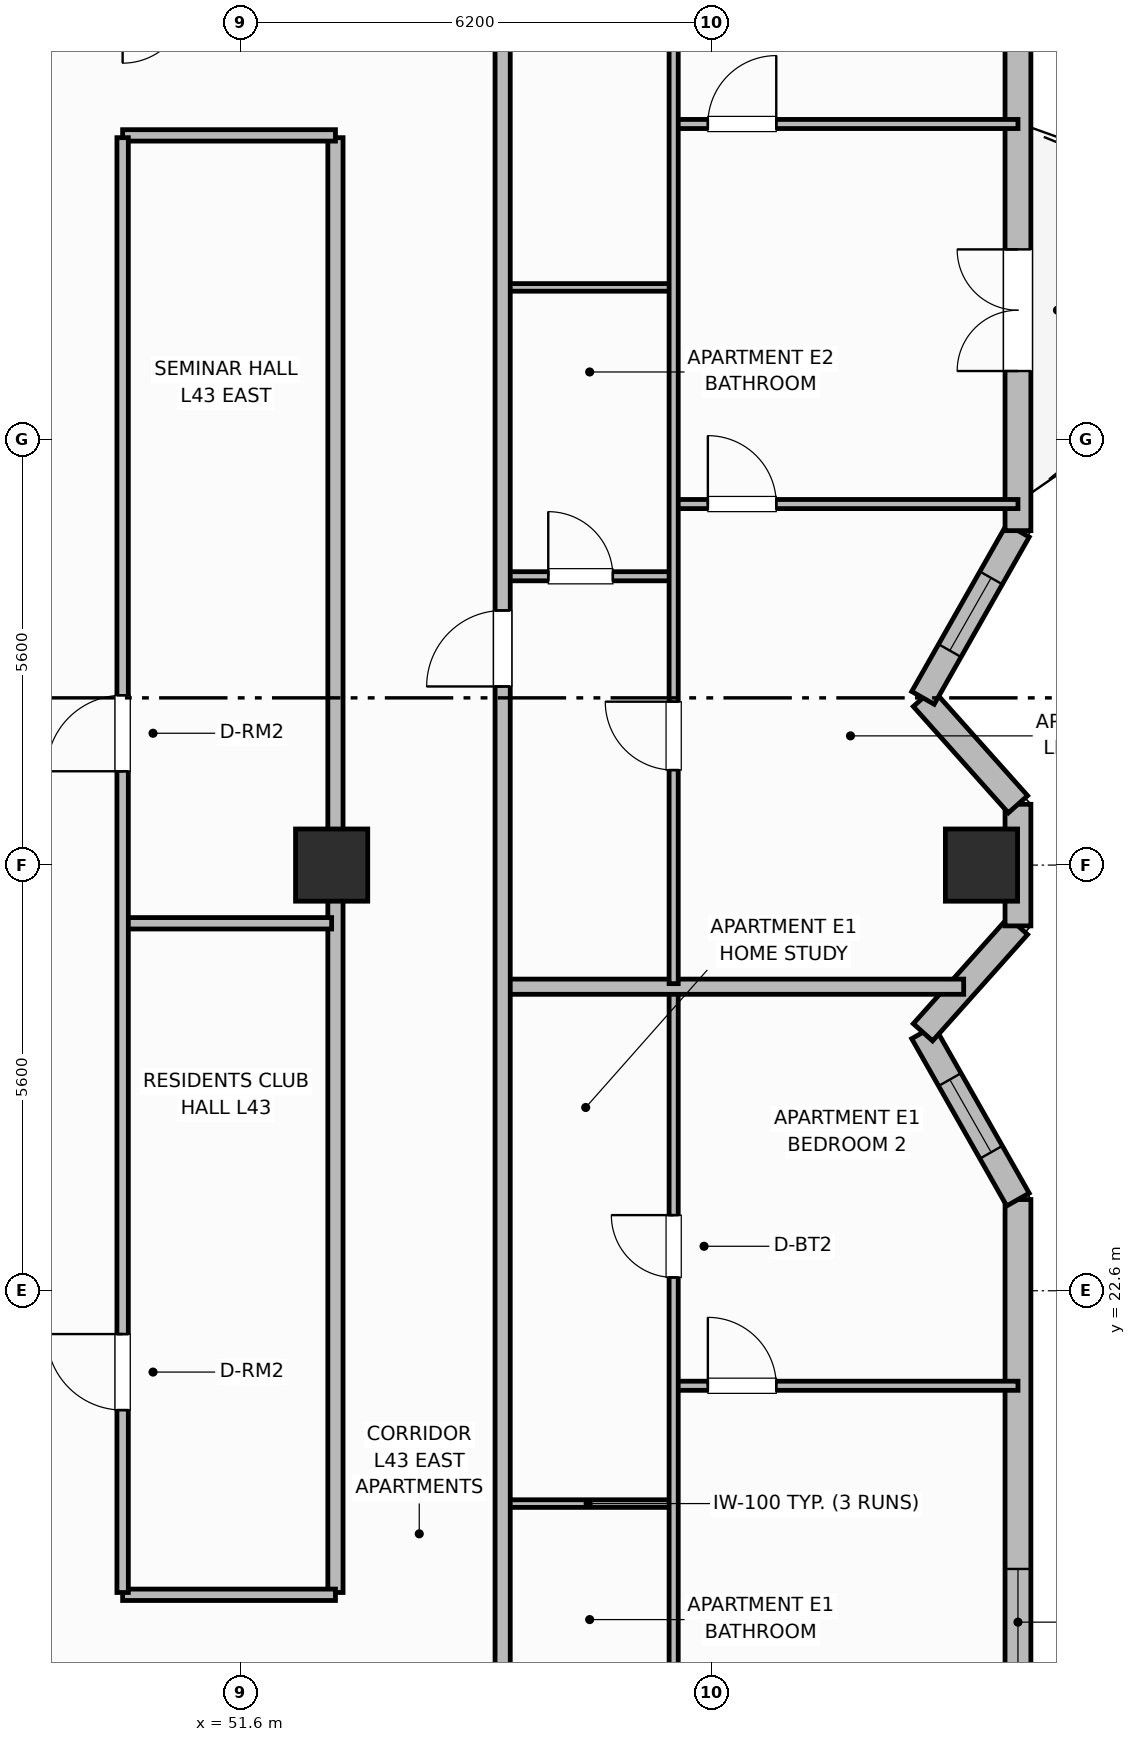
"""IFC4 building model, lengths in metres.
Left out: names, types, materials, properties, quantities, classifications, styles, units other than length and angle.
Written with IfcOpenShell. Run it as: python <this file> out.ifc"""

import sys

from ifc_helpers import new_model, si_unit, direction, frame, frame_2d, origin, origin_2d, place, context, subcontext, project, spatial, rectangle, extrude, element, fill, save


model = new_model("IFC4")
c1 = context("Model", 3, precision=1e-05, world=origin(), true_north=direction((0.0, 1.0)))
c2 = subcontext(c1, "Body", "Model", "MODEL_VIEW")
j1 = project(units=[si_unit("LENGTHUNIT", "METRE"), si_unit("PLANEANGLEUNIT", "RADIAN")], contexts=[c1])
p1 = place(None, origin())
s1 = spatial("IfcSite", under=j1, at=p1, CompositionType="ELEMENT")
p2 = place(p1, origin())
s2 = spatial("IfcBuilding", under=s1, at=p2, CompositionType="ELEMENT")
p3 = place(p2, frame((0.0, 0.0, 173.7)))
s3 = spatial("IfcBuildingStorey", under=s2, at=p3, CompositionType="ELEMENT", Elevation=173.7)
for number, where, z_axis, x_axis in (
    (1, (52.8, 28.2, 0.0), (0.0, 0.0, 1.0), (1.0, 0.0, 0.0)),
    (2, (61.35, 28.2, 0.0), (0.0, 0.0, 1.0), (1.0, 0.0, 0.0)),
):
    element("IfcColumn", number, at=place(p3, frame(where, z_axis=z_axis, x_axis=x_axis)), inside=s3, PredefinedType="COLUMN", context=c2, shape_type="SweptSolid", body=[
        extrude(rectangle(XDim=0.95, YDim=0.95, at=origin_2d()), origin(), (0.0, 0.0, 1.0), 3.7),
    ])
p4 = place(p3, frame((61.83, 10.5, 0.0), z_axis=(0.0, 0.0, 1.0), x_axis=(0.0, 1.0, 0.0)))
e3 = element("IfcWall", 3, at=p4, inside=s3, PredefinedType="SOLIDWALL", context=c2, shape_type="SweptSolid", body=[
    extrude(rectangle(XDim=13.3, YDim=0.34, at=frame_2d((6.65, 0.0))), origin(), (0.0, 0.0, 1.0), 2.72),
])
p5 = place(p4, frame((1.6, 0.0, 0.7)))
e4 = element("IfcOpeningElement", 4, at=p5, cuts=e3, PredefinedType="OPENING", context=c2, shape_type="SweptSolid", body=[
    extrude(rectangle(XDim=2.1, YDim=1.9, at=frame_2d((1.05, 0.95))), frame((0.0, 0.18, 0.0), z_axis=(0.0, -1.0, 0.0), x_axis=(1.0, 0.0, 0.0)), (0.0, 0.0, 1.0), 0.36),
])
p6 = place(p4, frame((7.04, 0.0, 0.71)))
e5 = element("IfcOpeningElement", 5, at=p6, cuts=e3, PredefinedType="OPENING", context=c2, shape_type="SweptSolid", body=[
    extrude(rectangle(XDim=1.4, YDim=1.85, at=frame_2d((0.7, 0.925))), frame((0.0, 0.18, 0.0), z_axis=(0.0, -1.0, 0.0), x_axis=(1.0, 0.0, 0.0)), (0.0, 0.0, 1.0), 0.36),
])
p7 = place(p3, frame((61.83, 23.8, 0.0), z_axis=(0.0, 0.0, 1.0), x_axis=(-0.494017696272, 0.869451847873, 0.0)))
e6 = element("IfcWall", 6, at=p7, inside=s3, PredefinedType="SOLIDWALL", context=c2, shape_type="SweptSolid", body=[
    extrude(rectangle(XDim=2.53, YDim=0.34, at=frame_2d((1.265, 0.0))), origin(), (0.0, 0.0, 1.0), 2.72),
])
p8 = place(p7, frame((0.715, 0.0, 0.91)))
e7 = element("IfcOpeningElement", 7, at=p8, cuts=e6, PredefinedType="OPENING", context=c2, shape_type="SweptSolid", body=[
    extrude(rectangle(XDim=1.1, YDim=1.65, at=frame_2d((0.55, 0.825))), frame((0.0, 0.18, 0.0), z_axis=(0.0, -1.0, 0.0), x_axis=(1.0, 0.0, 0.0)), (0.0, 0.0, 1.0), 0.36),
])
p9 = place(p3, frame((60.58, 26.0, 0.0), z_axis=(0.0, 0.0, 1.0), x_axis=(0.666041619974, 0.74591457987, 0.0)))
e8 = element("IfcWall", 8, at=p9, inside=s3, PredefinedType="SOLIDWALL", context=c2, shape_type="SweptSolid", body=[
    extrude(rectangle(XDim=1.877, YDim=0.34, at=frame_2d((0.938, 0.0))), origin(), (0.0, 0.0, 1.0), 2.72),
])
p10 = place(p3, frame((61.83, 27.4, 0.0), z_axis=(0.0, 0.0, 1.0), x_axis=(0.0, 1.0, 0.0)))
e9 = element("IfcWall", 9, at=p10, inside=s3, PredefinedType="SOLIDWALL", context=c2, shape_type="SweptSolid", body=[
    extrude(rectangle(XDim=1.6, YDim=0.34, at=frame_2d((0.8, 0.0))), origin(), (0.0, 0.0, 1.0), 2.72),
])
p11 = place(p3, frame((61.83, 29.0, 0.0), z_axis=(0.0, 0.0, 1.0), x_axis=(-0.666041619974, 0.74591457987, 0.0)))
e10 = element("IfcWall", 10, at=p11, inside=s3, PredefinedType="SOLIDWALL", context=c2, shape_type="SweptSolid", body=[
    extrude(rectangle(XDim=1.877, YDim=0.34, at=frame_2d((0.938, 0.0))), origin(), (0.0, 0.0, 1.0), 2.72),
])
p12 = place(p3, frame((60.58, 30.4, 0.0), z_axis=(0.0, 0.0, 1.0), x_axis=(0.493976255291, 0.869475393101, 0.0)))
e11 = element("IfcWall", 11, at=p12, inside=s3, PredefinedType="SOLIDWALL", context=c2, shape_type="SweptSolid", body=[
    extrude(rectangle(XDim=2.531, YDim=0.34, at=frame_2d((1.265, 0.0))), origin(), (0.0, 0.0, 1.0), 2.72),
])
p13 = place(p12, frame((0.715, 0.0, 0.91)))
e12 = element("IfcOpeningElement", 12, at=p13, cuts=e11, PredefinedType="OPENING", context=c2, shape_type="SweptSolid", body=[
    extrude(rectangle(XDim=1.1, YDim=1.65, at=frame_2d((0.55, 0.825))), frame((0.0, 0.18, 0.0), z_axis=(0.0, -1.0, 0.0), x_axis=(1.0, 0.0, 0.0)), (0.0, 0.0, 1.0), 0.36),
])
p14 = place(p3, frame((61.83, 32.6, 0.0), z_axis=(0.0, 0.0, 1.0), x_axis=(0.0, 1.0, 0.0)))
e13 = element("IfcWall", 13, at=p14, inside=s3, PredefinedType="SOLIDWALL", context=c2, shape_type="SweptSolid", body=[
    extrude(rectangle(XDim=13.3, YDim=0.34, at=frame_2d((6.65, 0.0))), origin(), (0.0, 0.0, 1.0), 2.72),
])
p15 = place(p14, frame((2.1, 0.0, 0.0)))
e14 = element("IfcOpeningElement", 14, at=p15, cuts=e13, PredefinedType="OPENING", context=c2, shape_type="SweptSolid", body=[
    extrude(rectangle(XDim=1.6, YDim=2.1, at=frame_2d((0.8, 1.05))), frame((0.0, 0.18, 0.0), z_axis=(0.0, -1.0, 0.0), x_axis=(1.0, 0.0, 0.0)), (0.0, 0.0, 1.0), 0.36),
])
p16 = place(p14, frame((9.75, 0.0, 0.75)))
e15 = element("IfcOpeningElement", 15, at=p16, cuts=e13, PredefinedType="OPENING", context=c2, shape_type="SweptSolid", body=[
    extrude(rectangle(XDim=1.8, YDim=1.85, at=frame_2d((0.9, 0.925))), frame((0.0, 0.18, 0.0), z_axis=(0.0, -1.0, 0.0), x_axis=(1.0, 0.0, 0.0)), (0.0, 0.0, 1.0), 0.36),
])
p17 = place(p3, frame((52.85, 18.63, 0.0), z_axis=(0.0, 0.0, 1.0), x_axis=(0.0, 1.0, 0.0)))
e16 = element("IfcWall", 16, at=p17, inside=s3, PredefinedType="PARTITIONING", context=c2, shape_type="SweptSolid", body=[
    extrude(rectangle(XDim=19.14, YDim=0.2, at=frame_2d((9.57, 0.0))), origin(), (0.0, 0.0, 1.0), 2.55),
])
for number, where, z_axis, x_axis in (
    (17, (50.05, 18.6, 0.0), (0.0, 0.0, 1.0), (1.0, 0.0, 0.0)),
    (18, (50.05, 37.8, 0.0), (0.0, 0.0, 1.0), (1.0, 0.0, 0.0)),
):
    element("IfcWall", number, at=place(p3, frame(where, z_axis=z_axis, x_axis=x_axis)), inside=s3, PredefinedType="PARTITIONING", context=c2, shape_type="SweptSolid", body=[
        extrude(rectangle(XDim=2.8, YDim=0.15, at=frame_2d((1.4, 0.0))), origin(), (0.0, 0.0, 1.0), 2.55),
    ])
p18 = place(p3, frame((50.08, 27.434, 0.0), z_axis=(0.0, 0.0, 1.0), x_axis=(1.0, 0.0, 0.0)))
e19 = element("IfcWall", 19, at=p18, inside=s3, PredefinedType="PARTITIONING", context=c2, shape_type="SweptSolid", body=[
    extrude(rectangle(XDim=2.72, YDim=0.15, at=frame_2d((1.36, 0.0))), origin(), (0.0, 0.0, 1.0), 2.55),
])
p19 = place(p3, frame((50.05, 18.63, 0.0), z_axis=(0.0, 0.0, 1.0), x_axis=(0.0, 1.0, 0.0)))
e20 = element("IfcWall", 20, at=p19, inside=s3, PredefinedType="PARTITIONING", context=c2, shape_type="SweptSolid", body=[
    extrude(rectangle(XDim=19.14, YDim=0.15, at=frame_2d((9.57, 0.0))), origin(), (0.0, 0.0, 1.0), 2.55),
])
p20 = place(p19, frame((2.4, 0.0, 0.0)))
e21 = element("IfcOpeningElement", 21, at=p20, cuts=e20, PredefinedType="OPENING", context=c2, shape_type="SweptSolid", body=[
    extrude(rectangle(XDim=1.0, YDim=2.15, at=frame_2d((0.5, 1.075))), frame((0.0, 0.085, 0.0), z_axis=(0.0, -1.0, 0.0), x_axis=(1.0, 0.0, 0.0)), (0.0, 0.0, 1.0), 0.17),
])
p21 = place(p19, frame((10.804, 0.0, 0.0)))
e22 = element("IfcOpeningElement", 22, at=p21, cuts=e20, PredefinedType="OPENING", context=c2, shape_type="SweptSolid", body=[
    extrude(rectangle(XDim=1.0, YDim=2.15, at=frame_2d((0.5, 1.075))), frame((0.0, 0.085, 0.0), z_axis=(0.0, -1.0, 0.0), x_axis=(1.0, 0.0, 0.0)), (0.0, 0.0, 1.0), 0.17),
])
p22 = place(p3, frame((55.05, 19.8, 0.0), z_axis=(0.0, 0.0, 1.0), x_axis=(1.0, 0.0, 0.0)))
e23 = element("IfcWall", 23, at=p22, inside=s3, PredefinedType="PARTITIONING", context=c2, shape_type="SweptSolid", body=[
    extrude(rectangle(XDim=2.25, YDim=0.1, at=frame_2d((1.125, 0.0))), origin(), (0.0, 0.0, 1.0), 2.55),
])
p23 = place(p3, frame((57.3, 21.35, 0.0), z_axis=(0.0, 0.0, 1.0), x_axis=(1.0, 0.0, 0.0)))
e24 = element("IfcWall", 24, at=p23, inside=s3, PredefinedType="PARTITIONING", context=c2, shape_type="SweptSolid", body=[
    extrude(rectangle(XDim=4.53, YDim=0.12, at=frame_2d((2.265, 0.0))), origin(), (0.0, 0.0, 1.0), 2.55),
])
p24 = place(p23, frame((0.45, 0.0, 0.0)))
e25 = element("IfcOpeningElement", 25, at=p24, cuts=e24, PredefinedType="OPENING", context=c2, shape_type="SweptSolid", body=[
    extrude(rectangle(XDim=0.9, YDim=2.1, at=frame_2d((0.45, 1.05))), frame((0.0, 0.07, 0.0), z_axis=(0.0, -1.0, 0.0), x_axis=(1.0, 0.0, 0.0)), (0.0, 0.0, 1.0), 0.14),
])
p25 = place(p3, frame((57.3, 10.64, 0.0), z_axis=(0.0, 0.0, 1.0), x_axis=(0.0, 1.0, 0.0)))
e26 = element("IfcWall", 26, at=p25, inside=s3, PredefinedType="PARTITIONING", context=c2, shape_type="SweptSolid", body=[
    extrude(rectangle(XDim=15.92, YDim=0.12, at=frame_2d((7.96, 0.0))), origin(), (0.0, 0.0, 1.0), 2.55),
])
p26 = place(p25, frame((0.41, 0.0, 0.0)))
e27 = element("IfcOpeningElement", 27, at=p26, cuts=e26, PredefinedType="OPENING", context=c2, shape_type="SweptSolid", body=[
    extrude(rectangle(XDim=0.9, YDim=2.1, at=frame_2d((0.45, 1.05))), frame((0.0, 0.07, 0.0), z_axis=(0.0, -1.0, 0.0), x_axis=(1.0, 0.0, 0.0)), (0.0, 0.0, 1.0), 0.14),
])
p27 = place(p25, frame((12.135, 0.0, 0.0)))
e28 = element("IfcOpeningElement", 28, at=p27, cuts=e26, PredefinedType="OPENING", context=c2, shape_type="SweptSolid", body=[
    extrude(rectangle(XDim=0.82, YDim=2.08, at=frame_2d((0.41, 1.04))), frame((0.0, 0.07, 0.0), z_axis=(0.0, -1.0, 0.0), x_axis=(1.0, 0.0, 0.0)), (0.0, 0.0, 1.0), 0.14),
])
p28 = place(p3, frame((55.05, 26.6, 0.0), z_axis=(0.0, 0.0, 1.0), x_axis=(1.0, 0.0, 0.0)))
e29 = element("IfcWall", 29, at=p28, inside=s3, PredefinedType="PARTITIONING", context=c2, shape_type="SweptSolid", body=[
    extrude(rectangle(XDim=6.066, YDim=0.2, at=frame_2d((3.033, 0.0))), origin(), (0.0, 0.0, 1.0), 2.55),
])
p29 = place(p3, frame((55.05, 32.0, 0.0), z_axis=(0.0, 0.0, 1.0), x_axis=(1.0, 0.0, 0.0)))
e30 = element("IfcWall", 30, at=p29, inside=s3, PredefinedType="PARTITIONING", context=c2, shape_type="SweptSolid", body=[
    extrude(rectangle(XDim=2.25, YDim=0.12, at=frame_2d((1.125, 0.0))), origin(), (0.0, 0.0, 1.0), 2.55),
])
p30 = place(p29, frame((0.6, 0.0, 0.0)))
e31 = element("IfcOpeningElement", 31, at=p30, cuts=e30, PredefinedType="OPENING", context=c2, shape_type="SweptSolid", body=[
    extrude(rectangle(XDim=0.85, YDim=2.1, at=frame_2d((0.425, 1.05))), frame((0.0, 0.07, 0.0), z_axis=(0.0, -1.0, 0.0), x_axis=(1.0, 0.0, 0.0)), (0.0, 0.0, 1.0), 0.14),
])
p31 = place(p3, frame((55.05, 35.8, 0.0), z_axis=(0.0, 0.0, 1.0), x_axis=(1.0, 0.0, 0.0)))
e32 = element("IfcWall", 32, at=p31, inside=s3, PredefinedType="PARTITIONING", context=c2, shape_type="SweptSolid", body=[
    extrude(rectangle(XDim=2.25, YDim=0.1, at=frame_2d((1.125, 0.0))), origin(), (0.0, 0.0, 1.0), 2.55),
])
p32 = place(p3, frame((57.3, 32.95, 0.0), z_axis=(0.0, 0.0, 1.0), x_axis=(1.0, 0.0, 0.0)))
e33 = element("IfcWall", 33, at=p32, inside=s3, PredefinedType="PARTITIONING", context=c2, shape_type="SweptSolid", body=[
    extrude(rectangle(XDim=4.53, YDim=0.12, at=frame_2d((2.265, 0.0))), origin(), (0.0, 0.0, 1.0), 2.55),
])
p33 = place(p32, frame((0.45, 0.0, 0.0)))
e34 = element("IfcOpeningElement", 34, at=p33, cuts=e33, PredefinedType="OPENING", context=c2, shape_type="SweptSolid", body=[
    extrude(rectangle(XDim=0.9, YDim=2.1, at=frame_2d((0.45, 1.05))), frame((0.0, 0.07, 0.0), z_axis=(0.0, -1.0, 0.0), x_axis=(1.0, 0.0, 0.0)), (0.0, 0.0, 1.0), 0.14),
])
p34 = place(p3, frame((57.3, 37.95, 0.0), z_axis=(0.0, 0.0, 1.0), x_axis=(1.0, 0.0, 0.0)))
e35 = element("IfcWall", 35, at=p34, inside=s3, PredefinedType="PARTITIONING", context=c2, shape_type="SweptSolid", body=[
    extrude(rectangle(XDim=4.53, YDim=0.12, at=frame_2d((2.265, 0.0))), origin(), (0.0, 0.0, 1.0), 2.55),
])
p35 = place(p34, frame((0.45, 0.0, 0.0)))
e36 = element("IfcOpeningElement", 36, at=p35, cuts=e35, PredefinedType="OPENING", context=c2, shape_type="SweptSolid", body=[
    extrude(rectangle(XDim=0.9, YDim=2.1, at=frame_2d((0.45, 1.05))), frame((0.0, 0.07, 0.0), z_axis=(0.0, -1.0, 0.0), x_axis=(1.0, 0.0, 0.0)), (0.0, 0.0, 1.0), 0.14),
])
p36 = place(p3, frame((57.3, 26.64, 0.0), z_axis=(0.0, 0.0, 1.0), x_axis=(0.0, 1.0, 0.0)))
e37 = element("IfcWall", 37, at=p36, inside=s3, PredefinedType="PARTITIONING", context=c2, shape_type="SweptSolid", body=[
    extrude(rectangle(XDim=19.12, YDim=0.12, at=frame_2d((9.56, 0.0))), origin(), (0.0, 0.0, 1.0), 2.55),
])
p37 = place(p36, frame((2.81, 0.0, 0.0)))
e38 = element("IfcOpeningElement", 38, at=p37, cuts=e37, PredefinedType="OPENING", context=c2, shape_type="SweptSolid", body=[
    extrude(rectangle(XDim=0.9, YDim=2.1, at=frame_2d((0.45, 1.05))), frame((0.0, 0.07, 0.0), z_axis=(0.0, -1.0, 0.0), x_axis=(1.0, 0.0, 0.0)), (0.0, 0.0, 1.0), 0.14),
])
p38 = place(p36, frame((15.365, 0.0, 0.0)))
e39 = element("IfcOpeningElement", 39, at=p38, cuts=e37, PredefinedType="OPENING", context=c2, shape_type="SweptSolid", body=[
    extrude(rectangle(XDim=0.82, YDim=2.08, at=frame_2d((0.41, 1.04))), frame((0.0, 0.07, 0.0), z_axis=(0.0, -1.0, 0.0), x_axis=(1.0, 0.0, 0.0)), (0.0, 0.0, 1.0), 0.14),
])
p39 = place(p3, frame((55.05, 10.6, 0.0), z_axis=(0.0, 0.0, 1.0), x_axis=(0.0, 1.0, 0.0)))
e40 = element("IfcWall", 40, at=p39, inside=s3, PredefinedType="PARTITIONING", context=c2, shape_type="SweptSolid", body=[
    extrude(rectangle(XDim=35.2, YDim=0.2, at=frame_2d((17.6, 0.0))), origin(), (0.0, 0.0, 1.0), 2.55),
])
p40 = place(p39, frame((2.65, 0.0, 0.0)))
e41 = element("IfcOpeningElement", 41, at=p40, cuts=e40, PredefinedType="OPENING", context=c2, shape_type="SweptSolid", body=[
    extrude(rectangle(XDim=1.0, YDim=2.15, at=frame_2d((0.5, 1.075))), frame((0.0, 0.11, 0.0), z_axis=(0.0, -1.0, 0.0), x_axis=(1.0, 0.0, 0.0)), (0.0, 0.0, 1.0), 0.22),
])
p41 = place(p39, frame((19.95, 0.0, 0.0)))
e42 = element("IfcOpeningElement", 42, at=p41, cuts=e40, PredefinedType="OPENING", context=c2, shape_type="SweptSolid", body=[
    extrude(rectangle(XDim=1.0, YDim=2.15, at=frame_2d((0.5, 1.075))), frame((0.0, 0.11, 0.0), z_axis=(0.0, -1.0, 0.0), x_axis=(1.0, 0.0, 0.0)), (0.0, 0.0, 1.0), 0.22),
])
p42 = place(p6, origin())
e43 = element("IfcWindow", 43, at=p42, inside=s3, PartitioningType="SINGLE_PANEL", PredefinedType="WINDOW", context=c2, shape_type="SweptSolid", body=[
    extrude(rectangle(XDim=1.4, YDim=1.85, at=frame_2d((0.7, 0.925))), frame((0.0, 0.03, 0.0), z_axis=(0.0, -1.0, 0.0), x_axis=(1.0, 0.0, 0.0)), (0.0, 0.0, 1.0), 0.06),
])
fill(e5, e43)
p43 = place(p8, origin())
e44 = element("IfcWindow", 44, at=p43, inside=s3, PartitioningType="SINGLE_PANEL", PredefinedType="WINDOW", context=c2, shape_type="SweptSolid", body=[
    extrude(rectangle(XDim=1.1, YDim=1.65, at=frame_2d((0.55, 0.825))), frame((0.0, 0.03, 0.0), z_axis=(0.0, -1.0, 0.0), x_axis=(1.0, 0.0, 0.0)), (0.0, 0.0, 1.0), 0.06),
])
fill(e7, e44)
p44 = place(p13, origin())
e45 = element("IfcWindow", 45, at=p44, inside=s3, PartitioningType="SINGLE_PANEL", PredefinedType="WINDOW", context=c2, shape_type="SweptSolid", body=[
    extrude(rectangle(XDim=1.1, YDim=1.65, at=frame_2d((0.55, 0.825))), frame((0.0, 0.03, 0.0), z_axis=(0.0, -1.0, 0.0), x_axis=(1.0, 0.0, 0.0)), (0.0, 0.0, 1.0), 0.06),
])
fill(e12, e45)
p45 = place(p15, origin())
e46 = element("IfcDoor", 46, at=p45, inside=s3, OperationType="DOUBLE_DOOR_SINGLE_SWING", PredefinedType="DOOR", context=c2, shape_type="SweptSolid", body=[
    extrude(rectangle(XDim=1.6, YDim=2.1, at=frame_2d((0.8, 1.05))), frame((0.0, 0.025, 0.0), z_axis=(0.0, -1.0, 0.0), x_axis=(1.0, 0.0, 0.0)), (0.0, 0.0, 1.0), 0.05),
])
fill(e14, e46)
p46 = place(p20, origin())
e47 = element("IfcDoor", 47, at=p46, inside=s3, OperationType="SINGLE_SWING_RIGHT", PredefinedType="DOOR", context=c2, shape_type="SweptSolid", body=[
    extrude(rectangle(XDim=1.0, YDim=2.15, at=frame_2d((0.5, 1.075))), frame((0.0, 0.025, 0.0), z_axis=(0.0, -1.0, 0.0), x_axis=(1.0, 0.0, 0.0)), (0.0, 0.0, 1.0), 0.05),
])
fill(e21, e47)
p47 = place(p21, origin())
e48 = element("IfcDoor", 48, at=p47, inside=s3, OperationType="SINGLE_SWING_LEFT", PredefinedType="DOOR", context=c2, shape_type="SweptSolid", body=[
    extrude(rectangle(XDim=1.0, YDim=2.15, at=frame_2d((0.5, 1.075))), frame((0.0, 0.025, 0.0), z_axis=(0.0, -1.0, 0.0), x_axis=(1.0, 0.0, 0.0)), (0.0, 0.0, 1.0), 0.05),
])
fill(e22, e48)
p48 = place(p24, origin())
e49 = element("IfcDoor", 49, at=p48, inside=s3, OperationType="SINGLE_SWING_LEFT", PredefinedType="DOOR", context=c2, shape_type="SweptSolid", body=[
    extrude(rectangle(XDim=0.9, YDim=2.1, at=frame_2d((0.45, 1.05))), frame((0.0, 0.025, 0.0), z_axis=(0.0, -1.0, 0.0), x_axis=(1.0, 0.0, 0.0)), (0.0, 0.0, 1.0), 0.05),
])
fill(e25, e49)
p49 = place(p27, origin())
e50 = element("IfcDoor", 50, at=p49, inside=s3, OperationType="SINGLE_SWING_RIGHT", PredefinedType="DOOR", context=c2, shape_type="SweptSolid", body=[
    extrude(rectangle(XDim=0.82, YDim=2.08, at=frame_2d((0.41, 1.04))), frame((0.0, 0.025, 0.0), z_axis=(0.0, -1.0, 0.0), x_axis=(1.0, 0.0, 0.0)), (0.0, 0.0, 1.0), 0.05),
])
fill(e28, e50)
p50 = place(p30, origin())
e51 = element("IfcDoor", 51, at=p50, inside=s3, OperationType="SINGLE_SWING_LEFT", PredefinedType="DOOR", context=c2, shape_type="SweptSolid", body=[
    extrude(rectangle(XDim=0.85, YDim=2.1, at=frame_2d((0.425, 1.05))), frame((0.0, 0.025, 0.0), z_axis=(0.0, -1.0, 0.0), x_axis=(1.0, 0.0, 0.0)), (0.0, 0.0, 1.0), 0.05),
])
fill(e31, e51)
p51 = place(p33, origin())
e52 = element("IfcDoor", 52, at=p51, inside=s3, OperationType="SINGLE_SWING_LEFT", PredefinedType="DOOR", context=c2, shape_type="SweptSolid", body=[
    extrude(rectangle(XDim=0.9, YDim=2.1, at=frame_2d((0.45, 1.05))), frame((0.0, 0.025, 0.0), z_axis=(0.0, -1.0, 0.0), x_axis=(1.0, 0.0, 0.0)), (0.0, 0.0, 1.0), 0.05),
])
fill(e34, e52)
p52 = place(p35, origin())
e53 = element("IfcDoor", 53, at=p52, inside=s3, OperationType="SINGLE_SWING_RIGHT", PredefinedType="DOOR", context=c2, shape_type="SweptSolid", body=[
    extrude(rectangle(XDim=0.9, YDim=2.1, at=frame_2d((0.45, 1.05))), frame((0.0, 0.025, 0.0), z_axis=(0.0, -1.0, 0.0), x_axis=(1.0, 0.0, 0.0)), (0.0, 0.0, 1.0), 0.05),
])
fill(e36, e53)
p53 = place(p37, origin())
e54 = element("IfcDoor", 54, at=p53, inside=s3, OperationType="SINGLE_SWING_RIGHT", PredefinedType="DOOR", context=c2, shape_type="SweptSolid", body=[
    extrude(rectangle(XDim=0.9, YDim=2.1, at=frame_2d((0.45, 1.05))), frame((0.0, 0.025, 0.0), z_axis=(0.0, -1.0, 0.0), x_axis=(1.0, 0.0, 0.0)), (0.0, 0.0, 1.0), 0.05),
])
fill(e38, e54)
p54 = place(p41, origin())
e55 = element("IfcDoor", 55, at=p54, inside=s3, OperationType="SINGLE_SWING_LEFT", PredefinedType="DOOR", context=c2, shape_type="SweptSolid", body=[
    extrude(rectangle(XDim=1.0, YDim=2.15, at=frame_2d((0.5, 1.075))), frame((0.0, 0.025, 0.0), z_axis=(0.0, -1.0, 0.0), x_axis=(1.0, 0.0, 0.0)), (0.0, 0.0, 1.0), 0.05),
])
fill(e42, e55)
save(model, sys.argv[1])
